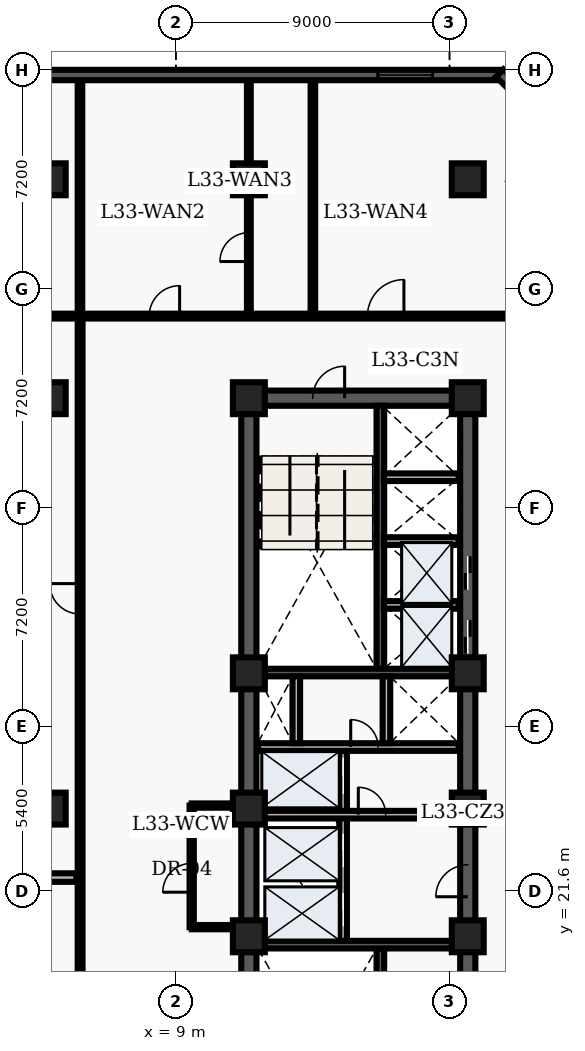
"""IFC4 building model, lengths in metres.
Left out: names, types, materials, properties, quantities, classifications, styles, units other than length and angle.
Written with IfcOpenShell. Run it as: python <this file> out.ifc"""

import sys

from ifc_helpers import new_model, entity, si_unit, converted_unit, direction, frame, origin_with_axes, origin_2d_with_axis, place, context, subcontext, project, spatial, polyline, rectangle, outline, extrude, element, fill, save


model = new_model("IFC4")
c1 = context("Model", 3, precision=1e-05, world=origin_with_axes(), true_north=direction((0.0, 1.0)))
c2 = subcontext(c1, "Body", "Model", "MODEL_VIEW")
j1 = project(units=[si_unit("LENGTHUNIT", "METRE"), converted_unit("PLANEANGLEUNIT", "DEGREE", entity("IfcPlaneAngleMeasure", 0.017), si_unit("PLANEANGLEUNIT", "RADIAN"), dimensions=[0, 0, 0, 0, 0, 0, 0])], contexts=[c1])
p1 = place(None, origin_with_axes())
s1 = spatial("IfcSite", under=j1, at=p1, CompositionType="ELEMENT")
p2 = place(p1, origin_with_axes())
s2 = spatial("IfcBuilding", under=s1, at=p2, CompositionType="ELEMENT")
p3 = place(p2, frame((0.0, 0.0, 136.8), z_axis=(0.0, 0.0, 1.0), x_axis=(1.0, 0.0, 0.0)))
s3 = spatial("IfcBuildingStorey", under=s2, at=p3, CompositionType="ELEMENT", Elevation=136.8)
p4 = place(p3, frame((11.4, 10.8, 0.0), z_axis=(0.0, 0.0, 1.0), x_axis=(0.0, 1.0, 0.0)))
e1 = element("IfcWall", 1, at=p4, inside=s3, PredefinedType="SHEAR", context=c2, shape_type="SweptSolid", body=[
    extrude(outline(polyline([(0.0, -0.25), (27.0, -0.25), (27.0, 0.25), (0.0, 0.25), (0.0, -0.25)])), origin_with_axes(), (0.0, 0.0, 1.0), 3.66),
])
p5 = place(p3, frame((11.4, 37.8, 0.0), z_axis=(0.0, 0.0, 1.0), x_axis=(1.0, 0.0, 0.0)))
e2 = element("IfcWall", 2, at=p5, inside=s3, PredefinedType="SHEAR", context=c2, shape_type="SweptSolid", body=[
    extrude(outline(polyline([(0.0, -0.25), (7.2, -0.25), (7.2, 0.25), (0.0, 0.25), (0.0, -0.25)])), origin_with_axes(), (0.0, 0.0, 1.0), 3.66),
])
p6 = place(p5, frame((2.625, 0.0, 0.0), z_axis=(0.0, 0.0, 1.0), x_axis=(1.0, 0.0, 0.0)))
e3 = element("IfcOpeningElement", 3, at=p6, cuts=e2, PredefinedType="OPENING", context=c2, shape_type="SweptSolid", body=[
    extrude(rectangle(XDim=1.05, YDim=0.52, at=origin_2d_with_axis()), origin_with_axes(), (0.0, 0.0, 1.0), 2.15),
])
p7 = place(p3, frame((18.6, 10.8, 0.0), z_axis=(0.0, 0.0, 1.0), x_axis=(0.0, 1.0, 0.0)))
e4 = element("IfcWall", 4, at=p7, inside=s3, PredefinedType="SHEAR", context=c2, shape_type="SweptSolid", body=[
    extrude(outline(polyline([(0.0, -0.25), (13.5, -0.25), (13.5, 0.25), (0.0, 0.25), (0.0, -0.25)])), origin_with_axes(), (0.0, 0.0, 1.0), 3.66),
])
p8 = place(p7, frame((11.125, 0.0, 0.0), z_axis=(0.0, 0.0, 1.0), x_axis=(1.0, 0.0, 0.0)))
e5 = element("IfcOpeningElement", 5, at=p8, cuts=e4, PredefinedType="OPENING", context=c2, shape_type="SweptSolid", body=[
    extrude(rectangle(XDim=1.05, YDim=0.52, at=origin_2d_with_axis()), origin_with_axes(), (0.0, 0.0, 1.0), 2.15),
])
p9 = place(p7, frame((4.325, 0.0, 0.0), z_axis=(0.0, 0.0, 1.0), x_axis=(1.0, 0.0, 0.0)))
e6 = element("IfcOpeningElement", 6, at=p9, cuts=e4, PredefinedType="OPENING", context=c2, shape_type="SweptSolid", body=[
    extrude(rectangle(XDim=1.05, YDim=0.52, at=origin_2d_with_axis()), origin_with_axes(), (0.0, 0.0, 1.0), 2.15),
])
p10 = place(p3, frame((18.6, 24.3, 0.0), z_axis=(0.0, 0.0, 1.0), x_axis=(0.0, 1.0, 0.0)))
e7 = element("IfcWall", 7, at=p10, inside=s3, PredefinedType="SHEAR", context=c2, shape_type="SweptSolid", body=[
    extrude(outline(polyline([(0.0, -0.25), (13.5, -0.25), (13.5, 0.25), (0.0, 0.25), (0.0, -0.25)])), origin_with_axes(), (0.0, 0.0, 1.0), 3.66),
])
p11 = place(p10, frame((5.65, 0.0, 0.0), z_axis=(0.0, 0.0, 1.0), x_axis=(1.0, 0.0, 0.0)))
e8 = element("IfcOpeningElement", 8, at=p11, cuts=e7, PredefinedType="OPENING", context=c2, shape_type="SweptSolid", body=[
    extrude(rectangle(XDim=1.1, YDim=0.52, at=origin_2d_with_axis()), origin_with_axes(), (0.0, 0.0, 1.0), 2.15),
])
p12 = place(p10, frame((7.75, 0.0, 0.0), z_axis=(0.0, 0.0, 1.0), x_axis=(1.0, 0.0, 0.0)))
e9 = element("IfcOpeningElement", 9, at=p12, cuts=e7, PredefinedType="OPENING", context=c2, shape_type="SweptSolid", body=[
    extrude(rectangle(XDim=1.1, YDim=0.52, at=origin_2d_with_axis()), origin_with_axes(), (0.0, 0.0, 1.0), 2.15),
])
p13 = place(p3, frame((15.725, 11.05, 0.0), z_axis=(0.0, 0.0, 1.0), x_axis=(0.0, 1.0, 0.0)))
e10 = element("IfcWall", 10, at=p13, inside=s3, PredefinedType="SHEAR", context=c2, shape_type="SweptSolid", body=[
    extrude(outline(polyline([(0.0, -0.125), (8.65, -0.125), (8.65, 0.125), (0.0, 0.125), (0.0, -0.125)])), origin_with_axes(), (0.0, 0.0, 1.0), 3.66),
])
p14 = place(p3, frame((11.65, 19.825, 0.0), z_axis=(0.0, 0.0, 1.0), x_axis=(1.0, 0.0, 0.0)))
e11 = element("IfcWall", 11, at=p14, inside=s3, PredefinedType="SHEAR", context=c2, shape_type="SweptSolid", body=[
    extrude(outline(polyline([(0.0, -0.125), (6.7, -0.125), (6.7, 0.125), (0.0, 0.125), (0.0, -0.125)])), origin_with_axes(), (0.0, 0.0, 1.0), 3.66),
])
p15 = place(p3, frame((15.725, 28.9, 0.0), z_axis=(0.0, 0.0, 1.0), x_axis=(0.0, 1.0, 0.0)))
e12 = element("IfcWall", 12, at=p15, inside=s3, PredefinedType="SHEAR", context=c2, shape_type="SweptSolid", body=[
    extrude(outline(polyline([(0.0, -0.125), (8.65, -0.125), (8.65, 0.125), (0.0, 0.125), (0.0, -0.125)])), origin_with_axes(), (0.0, 0.0, 1.0), 3.66),
])
p16 = place(p3, frame((11.65, 28.775, 0.0), z_axis=(0.0, 0.0, 1.0), x_axis=(1.0, 0.0, 0.0)))
e13 = element("IfcWall", 13, at=p16, inside=s3, PredefinedType="SHEAR", context=c2, shape_type="SweptSolid", body=[
    extrude(outline(polyline([(0.0, -0.125), (6.7, -0.125), (6.7, 0.125), (0.0, 0.125), (0.0, -0.125)])), origin_with_axes(), (0.0, 0.0, 1.0), 3.66),
])
p17 = place(p3, frame((14.5, 19.95, 0.0), z_axis=(0.0, 0.0, 1.0), x_axis=(0.0, 1.0, 0.0)))
e14 = element("IfcWall", 14, at=p17, inside=s3, PredefinedType="SOLIDWALL", context=c2, shape_type="SweptSolid", body=[
    extrude(outline(polyline([(0.0, -0.125), (6.25, -0.125), (6.25, 0.125), (0.0, 0.125), (0.0, -0.125)])), origin_with_axes(), (0.0, 0.0, 1.0), 2.7),
])
p18 = place(p17, frame((1.025, 0.0, 0.0), z_axis=(0.0, 0.0, 1.0), x_axis=(1.0, 0.0, 0.0)))
e15 = element("IfcOpeningElement", 15, at=p18, cuts=e14, PredefinedType="OPENING", context=c2, shape_type="SweptSolid", body=[
    extrude(rectangle(XDim=1.1, YDim=0.27, at=origin_2d_with_axis()), origin_with_axes(), (0.0, 0.0, 1.0), 2.15),
])
p19 = place(p17, frame((2.975, 0.0, 0.0), z_axis=(0.0, 0.0, 1.0), x_axis=(1.0, 0.0, 0.0)))
e16 = element("IfcOpeningElement", 16, at=p19, cuts=e14, PredefinedType="OPENING", context=c2, shape_type="SweptSolid", body=[
    extrude(rectangle(XDim=1.1, YDim=0.27, at=origin_2d_with_axis()), origin_with_axes(), (0.0, 0.0, 1.0), 2.15),
])
p20 = place(p17, frame((5.425, 0.0, 0.0), z_axis=(0.0, 0.0, 1.0), x_axis=(1.0, 0.0, 0.0)))
e17 = element("IfcOpeningElement", 17, at=p20, cuts=e14, PredefinedType="OPENING", context=c2, shape_type="SweptSolid", body=[
    extrude(rectangle(XDim=1.2, YDim=0.27, at=origin_2d_with_axis()), origin_with_axes(), (0.0, 0.0, 1.0), 2.15),
])
p21 = place(p3, frame((11.7, 24.1, 0.0), z_axis=(0.0, 0.0, 1.0), x_axis=(1.0, 0.0, 0.0)))
e18 = element("IfcWall", 18, at=p21, inside=s3, PredefinedType="SOLIDWALL", context=c2, shape_type="SweptSolid", body=[
    extrude(outline(polyline([(0.0, -0.125), (6.6, -0.125), (6.6, 0.125), (0.0, 0.125), (0.0, -0.125)])), origin_with_axes(), (0.0, 0.0, 1.0), 2.7),
])
p22 = place(p21, frame((3.75, 0.0, 0.0), z_axis=(0.0, 0.0, 1.0), x_axis=(1.0, 0.0, 0.0)))
e19 = element("IfcOpeningElement", 19, at=p22, cuts=e18, PredefinedType="OPENING", context=c2, shape_type="SweptSolid", body=[
    extrude(rectangle(XDim=0.9, YDim=0.27, at=origin_2d_with_axis()), origin_with_axes(), (0.0, 0.0, 1.0), 2.15),
])
p23 = place(p3, frame((11.7, 26.325, 0.0), z_axis=(0.0, 0.0, 1.0), x_axis=(1.0, 0.0, 0.0)))
e20 = element("IfcWall", 20, at=p23, inside=s3, PredefinedType="SOLIDWALL", context=c2, shape_type="SweptSolid", body=[
    extrude(outline(polyline([(0.0, -0.125), (6.6, -0.125), (6.6, 0.125), (0.0, 0.125), (0.0, -0.125)])), origin_with_axes(), (0.0, 0.0, 1.0), 2.7),
])
p24 = place(p23, frame((3.5, 0.0, 0.0), z_axis=(0.0, 0.0, 1.0), x_axis=(1.0, 0.0, 0.0)))
e21 = element("IfcOpeningElement", 21, at=p24, cuts=e20, PredefinedType="OPENING", context=c2, shape_type="SweptSolid", body=[
    extrude(rectangle(XDim=0.9, YDim=0.27, at=origin_2d_with_axis()), origin_with_axes(), (0.0, 0.0, 1.0), 2.15),
])
for number, where, z_axis, x_axis in (
    (22, (12.96, 26.45, 0.0), (0.0, 0.0, 1.0), (0.0, 1.0, 0.0)),
    (23, (15.925, 26.45, 0.0), (0.0, 0.0, 1.0), (0.0, 1.0, 0.0)),
):
    element("IfcWall", number, at=place(p3, frame(where, z_axis=z_axis, x_axis=x_axis)), inside=s3, PredefinedType="SOLIDWALL", context=c2, shape_type="SweptSolid", body=[
        extrude(outline(polyline([(0.0, -0.125), (2.2, -0.125), (2.2, 0.125), (0.0, 0.125), (0.0, -0.125)])), origin_with_axes(), (0.0, 0.0, 1.0), 2.7),
    ])
for number, where, z_axis, x_axis in (
    (24, (11.4, 20.1, 0.0), (0.0, 0.0, 1.0), (1.0, 0.0, 0.0)),
    (25, (11.4, 24.3, 0.0), (0.0, 0.0, 1.0), (1.0, 0.0, 0.0)),
    (26, (11.4, 28.75, 0.0), (0.0, 0.0, 1.0), (1.0, 0.0, 0.0)),
    (27, (11.4, 37.8, 0.0), (0.0, 0.0, 1.0), (1.0, 0.0, 0.0)),
    (28, (11.4, 45.0, 0.0), (0.0, 0.0, 1.0), (1.0, 0.0, 0.0)),
    (29, (18.6, 20.1, 0.0), (0.0, 0.0, 1.0), (1.0, 0.0, 0.0)),
    (30, (18.6, 24.3, 0.0), (0.0, 0.0, 1.0), (1.0, 0.0, 0.0)),
    (31, (18.6, 28.75, 0.0), (0.0, 0.0, 1.0), (1.0, 0.0, 0.0)),
    (32, (18.6, 37.8, 0.0), (0.0, 0.0, 1.0), (1.0, 0.0, 0.0)),
    (33, (18.6, 45.0, 0.0), (0.0, 0.0, 1.0), (1.0, 0.0, 0.0)),
    (34, (4.85, 24.3, 0.0), (0.0, 0.0, 1.0), (1.0, 0.0, 0.0)),
    (35, (4.85, 37.8, 0.0), (0.0, 0.0, 1.0), (1.0, 0.0, 0.0)),
    (36, (4.85, 45.0, 0.0), (0.0, 0.0, 1.0), (1.0, 0.0, 0.0)),
):
    element("IfcColumn", number, at=place(p3, frame(where, z_axis=z_axis, x_axis=x_axis)), inside=s3, PredefinedType="COLUMN", context=c2, shape_type="SweptSolid", body=[
        extrude(rectangle(XDim=1.05, YDim=1.05, at=origin_2d_with_axis()), origin_with_axes(), (0.0, 0.0, 1.0), 3.9),
    ])
for number, where, z_axis, x_axis in (
    (37, (15.84, 31.0, 0.0), (0.0, 0.0, 1.0), (1.0, 0.0, 0.0)),
    (38, (15.84, 33.1, 0.0), (0.0, 0.0, 1.0), (1.0, 0.0, 0.0)),
    (39, (15.84, 35.2, 0.0), (0.0, 0.0, 1.0), (1.0, 0.0, 0.0)),
):
    element("IfcWall", number, at=place(p3, frame(where, z_axis=z_axis, x_axis=x_axis)), inside=s3, PredefinedType="SOLIDWALL", context=c2, shape_type="SweptSolid", body=[
        extrude(outline(polyline([(0.0, -0.125), (2.46, -0.125), (2.46, 0.125), (0.0, 0.125), (0.0, -0.125)])), origin_with_axes(), (0.0, 0.0, 1.0), 2.7),
    ])
p25 = place(p3, frame((9.52, 20.4, 0.0), z_axis=(0.0, 0.0, 1.0), x_axis=(0.0, 1.0, 0.0)))
e40 = element("IfcWall", 40, at=p25, inside=s3, PredefinedType="PARTITIONING", context=c2, shape_type="SweptSolid", body=[
    extrude(outline(polyline([(0.0, -0.07), (4.0, -0.07), (4.0, 0.07), (0.0, 0.07), (0.0, -0.07)])), origin_with_axes(), (0.0, 0.0, 1.0), 2.7),
])
p26 = place(p25, frame((1.625, 0.0, 0.0), z_axis=(0.0, 0.0, 1.0), x_axis=(1.0, 0.0, 0.0)))
e41 = element("IfcOpeningElement", 41, at=p26, cuts=e40, PredefinedType="OPENING", context=c2, shape_type="SweptSolid", body=[
    extrude(rectangle(XDim=0.95, YDim=0.16, at=origin_2d_with_axis()), origin_with_axes(), (0.0, 0.0, 1.0), 2.15),
])
for number, where, z_axis, x_axis in (
    (42, (9.52, 20.4, 0.0), (0.0, 0.0, 1.0), (1.0, 0.0, 0.0)),
    (43, (9.52, 24.4, 0.0), (0.0, 0.0, 1.0), (1.0, 0.0, 0.0)),
):
    element("IfcWall", number, at=place(p3, frame(where, z_axis=z_axis, x_axis=x_axis)), inside=s3, PredefinedType="PARTITIONING", context=c2, shape_type="SweptSolid", body=[
        extrude(outline(polyline([(0.0, -0.07), (1.58, -0.07), (1.58, 0.07), (0.0, 0.07), (0.0, -0.07)])), origin_with_axes(), (0.0, 0.0, 1.0), 2.7),
    ])
p27 = place(p3, frame((2.6, 40.5, 0.0), z_axis=(0.0, 0.0, 1.0), x_axis=(1.0, 0.0, 0.0)))
e44 = element("IfcWall", 44, at=p27, inside=s3, PredefinedType="PARTITIONING", context=c2, shape_type="SweptSolid", body=[
    extrude(outline(polyline([(0.0, -0.08), (18.89, -0.08), (18.89, 0.08), (0.0, 0.08), (0.0, -0.08)])), origin_with_axes(), (0.0, 0.0, 1.0), 2.7),
])
p28 = place(p27, frame((1.057, 0.0, 0.0), z_axis=(0.0, 0.0, 1.0), x_axis=(1.0, 0.0, 0.0)))
e45 = element("IfcOpeningElement", 45, at=p28, cuts=e44, PredefinedType="OPENING", context=c2, shape_type="SweptSolid", body=[
    extrude(rectangle(XDim=1.0, YDim=0.18, at=origin_2d_with_axis()), origin_with_axes(), (0.0, 0.0, 1.0), 2.15),
])
p29 = place(p27, frame((6.022, 0.0, 0.0), z_axis=(0.0, 0.0, 1.0), x_axis=(1.0, 0.0, 0.0)))
e46 = element("IfcOpeningElement", 46, at=p29, cuts=e44, PredefinedType="OPENING", context=c2, shape_type="SweptSolid", body=[
    extrude(rectangle(XDim=1.0, YDim=0.18, at=origin_2d_with_axis()), origin_with_axes(), (0.0, 0.0, 1.0), 2.15),
])
p30 = place(p27, frame((13.3, 0.0, 0.0), z_axis=(0.0, 0.0, 1.0), x_axis=(1.0, 0.0, 0.0)))
e47 = element("IfcOpeningElement", 47, at=p30, cuts=e44, PredefinedType="OPENING", context=c2, shape_type="SweptSolid", body=[
    extrude(rectangle(XDim=1.2, YDim=0.18, at=origin_2d_with_axis()), origin_with_axes(), (0.0, 0.0, 1.0), 2.2),
])
p31 = place(p3, frame((5.85, 7.8, 0.0), z_axis=(0.0, 0.0, 1.0), x_axis=(0.0, 1.0, 0.0)))
e48 = element("IfcWall", 48, at=p31, inside=s3, PredefinedType="PARTITIONING", context=c2, shape_type="SweptSolid", body=[
    extrude(outline(polyline([(0.0, -0.08), (32.7, -0.08), (32.7, 0.08), (0.0, 0.08), (0.0, -0.08)])), origin_with_axes(), (0.0, 0.0, 1.0), 2.7),
])
p32 = place(p31, frame((7.181, 0.0, 0.0), z_axis=(0.0, 0.0, 1.0), x_axis=(1.0, 0.0, 0.0)))
e49 = element("IfcOpeningElement", 49, at=p32, cuts=e48, PredefinedType="OPENING", context=c2, shape_type="SweptSolid", body=[
    extrude(rectangle(XDim=1.0, YDim=0.18, at=origin_2d_with_axis()), origin_with_axes(), (0.0, 0.0, 1.0), 2.15),
])
p33 = place(p31, frame((23.401, 0.0, 0.0), z_axis=(0.0, 0.0, 1.0), x_axis=(1.0, 0.0, 0.0)))
e50 = element("IfcOpeningElement", 50, at=p33, cuts=e48, PredefinedType="OPENING", context=c2, shape_type="SweptSolid", body=[
    extrude(rectangle(XDim=1.0, YDim=0.18, at=origin_2d_with_axis()), origin_with_axes(), (0.0, 0.0, 1.0), 2.15),
])
p34 = place(p3, frame((0.335, 22.031, 0.0), z_axis=(0.0, 0.0, 1.0), x_axis=(1.0, 0.0, 0.0)))
e51 = element("IfcWall", 51, at=p34, inside=s3, PredefinedType="PARTITIONING", context=c2, shape_type="SweptSolid", body=[
    extrude(outline(polyline([(0.0, -0.14), (5.395, -0.14), (5.395, 0.14), (0.0, 0.14), (0.0, -0.14)])), origin_with_axes(), (0.0, 0.0, 1.0), 2.7),
])
p35 = place(p3, frame((5.845, 40.6, 0.0), z_axis=(0.0, 0.0, 1.0), x_axis=(0.0, 1.0, 0.0)))
e52 = element("IfcWall", 52, at=p35, inside=s3, PredefinedType="PARTITIONING", context=c2, shape_type="SweptSolid", body=[
    extrude(outline(polyline([(0.0, -0.075), (7.665, -0.075), (7.665, 0.075), (0.0, 0.075), (0.0, -0.075)])), origin_with_axes(), (0.0, 0.0, 1.0), 2.7),
])
p36 = place(p3, frame((11.4, 40.6, 0.0), z_axis=(0.0, 0.0, 1.0), x_axis=(0.0, 1.0, 0.0)))
e53 = element("IfcWall", 53, at=p36, inside=s3, PredefinedType="PARTITIONING", context=c2, shape_type="SweptSolid", body=[
    extrude(outline(polyline([(0.0, -0.062), (7.665, -0.062), (7.665, 0.062), (0.0, 0.062), (0.0, -0.062)])), origin_with_axes(), (0.0, 0.0, 1.0), 2.7),
])
p37 = place(p36, frame((2.17, 0.0, 0.0), z_axis=(0.0, 0.0, 1.0), x_axis=(1.0, 0.0, 0.0)))
e54 = element("IfcOpeningElement", 54, at=p37, cuts=e53, PredefinedType="OPENING", context=c2, shape_type="SweptSolid", body=[
    extrude(rectangle(XDim=0.95, YDim=0.145, at=origin_2d_with_axis()), origin_with_axes(), (0.0, 0.0, 1.0), 2.15),
])
p38 = place(p3, frame((13.506, 40.6, 0.0), z_axis=(0.0, 0.0, 1.0), x_axis=(0.0, 1.0, 0.0)))
e55 = element("IfcWall", 55, at=p38, inside=s3, PredefinedType="PARTITIONING", context=c2, shape_type="SweptSolid", body=[
    extrude(outline(polyline([(0.0, -0.075), (7.665, -0.075), (7.665, 0.075), (0.0, 0.075), (0.0, -0.075)])), origin_with_axes(), (0.0, 0.0, 1.0), 2.7),
])
p39 = place(p3, frame((2.74, 48.43, 0.0), z_axis=(0.0, 0.0, 1.0), x_axis=(1.0, 0.0, 0.0)))
e56 = element("IfcWall", 56, at=p39, inside=s3, PredefinedType="SOLIDWALL", context=c2, shape_type="SweptSolid", body=[
    extrude(outline(polyline([(0.0, -0.17), (17.045, -0.17), (17.045, 0.17), (0.0, 0.17), (0.0, -0.17)])), origin_with_axes(), (0.0, 0.0, 1.0), 3.66),
])
p40 = place(p39, frame((13.804, 0.0, 0.45), z_axis=(0.0, 0.0, 1.0), x_axis=(1.0, 0.0, 0.0)))
e57 = element("IfcOpeningElement", 57, at=p40, cuts=e56, PredefinedType="OPENING", context=c2, shape_type="SweptSolid", body=[
    extrude(rectangle(XDim=1.8, YDim=0.36, at=origin_2d_with_axis()), origin_with_axes(), (0.0, 0.0, 1.0), 2.1),
])
p41 = place(p3, frame((19.651, 48.494, 0.0), z_axis=(0.0, 0.0, 1.0), x_axis=(0.707107, -0.707107, 0.0)))
e58 = element("IfcWall", 58, at=p41, inside=s3, PredefinedType="SOLIDWALL", context=c2, shape_type="SweptSolid", body=[
    extrude(outline(polyline([(0.0, -0.17), (2.905, -0.17), (2.905, 0.17), (0.0, 0.17), (0.0, -0.17)])), origin_with_axes(), (0.0, 0.0, 1.0), 3.66),
])
p42 = place(p10, frame((5.65, 0.0, 0.0), z_axis=(0.0, 0.0, 1.0), x_axis=(1.0, 0.0, 0.0)))
e59 = element("IfcDoor", 59, at=p42, inside=s3, OperationType="SLIDING_TO_LEFT", PredefinedType="DOOR", context=c2, shape_type="SweptSolid", body=[
    extrude(rectangle(XDim=1.1, YDim=0.09, at=origin_2d_with_axis()), origin_with_axes(), (0.0, 0.0, 1.0), 2.15),
])
fill(e8, e59)
p43 = place(p10, frame((7.75, 0.0, 0.0), z_axis=(0.0, 0.0, 1.0), x_axis=(1.0, 0.0, 0.0)))
e60 = element("IfcDoor", 60, at=p43, inside=s3, OperationType="SLIDING_TO_RIGHT", PredefinedType="DOOR", context=c2, shape_type="SweptSolid", body=[
    extrude(rectangle(XDim=1.1, YDim=0.09, at=origin_2d_with_axis()), origin_with_axes(), (0.0, 0.0, 1.0), 2.15),
])
fill(e9, e60)
p44 = place(p17, frame((1.025, 0.0, 0.0), z_axis=(0.0, 0.0, 1.0), x_axis=(1.0, 0.0, 0.0)))
e61 = element("IfcDoor", 61, at=p44, inside=s3, OperationType="SLIDING_TO_LEFT", PredefinedType="DOOR", context=c2, shape_type="SweptSolid", body=[
    extrude(rectangle(XDim=1.1, YDim=0.09, at=origin_2d_with_axis()), origin_with_axes(), (0.0, 0.0, 1.0), 2.15),
])
fill(e15, e61)
p45 = place(p17, frame((2.975, 0.0, 0.0), z_axis=(0.0, 0.0, 1.0), x_axis=(1.0, 0.0, 0.0)))
e62 = element("IfcDoor", 62, at=p45, inside=s3, OperationType="SLIDING_TO_RIGHT", PredefinedType="DOOR", context=c2, shape_type="SweptSolid", body=[
    extrude(rectangle(XDim=1.1, YDim=0.09, at=origin_2d_with_axis()), origin_with_axes(), (0.0, 0.0, 1.0), 2.15),
])
fill(e16, e62)
p46 = place(p17, frame((5.425, 0.0, 0.0), z_axis=(0.0, 0.0, 1.0), x_axis=(1.0, 0.0, 0.0)))
e63 = element("IfcDoor", 63, at=p46, inside=s3, OperationType="DOUBLE_DOOR_SLIDING", PredefinedType="DOOR", context=c2, shape_type="SweptSolid", body=[
    extrude(rectangle(XDim=1.2, YDim=0.09, at=origin_2d_with_axis()), origin_with_axes(), (0.0, 0.0, 1.0), 2.15),
])
fill(e17, e63)
p47 = place(p5, frame((2.625, 0.0, 0.0), z_axis=(0.0, 0.0, 1.0), x_axis=(1.0, 0.0, 0.0)))
e64 = element("IfcDoor", 64, at=p47, inside=s3, OperationType="SINGLE_SWING_RIGHT", PredefinedType="DOOR", context=c2, shape_type="SweptSolid", body=[
    extrude(rectangle(XDim=1.05, YDim=0.09, at=origin_2d_with_axis()), origin_with_axes(), (0.0, 0.0, 1.0), 2.15),
])
fill(e3, e64)
p48 = place(p7, frame((11.125, 0.0, 0.0), z_axis=(0.0, 0.0, 1.0), x_axis=(1.0, 0.0, 0.0)))
e65 = element("IfcDoor", 65, at=p48, inside=s3, OperationType="SINGLE_SWING_LEFT", PredefinedType="DOOR", context=c2, shape_type="SweptSolid", body=[
    extrude(rectangle(XDim=1.05, YDim=0.09, at=origin_2d_with_axis()), origin_with_axes(), (0.0, 0.0, 1.0), 2.15),
])
fill(e5, e65)
p49 = place(p21, frame((3.75, 0.0, 0.0), z_axis=(0.0, 0.0, 1.0), x_axis=(1.0, 0.0, 0.0)))
e66 = element("IfcDoor", 66, at=p49, inside=s3, OperationType="SINGLE_SWING_LEFT", PredefinedType="DOOR", context=c2, shape_type="SweptSolid", body=[
    extrude(rectangle(XDim=0.9, YDim=0.09, at=origin_2d_with_axis()), origin_with_axes(), (0.0, 0.0, 1.0), 2.15),
])
fill(e19, e66)
p50 = place(p23, frame((3.5, 0.0, 0.0), z_axis=(0.0, 0.0, 1.0), x_axis=(1.0, 0.0, 0.0)))
e67 = element("IfcDoor", 67, at=p50, inside=s3, OperationType="SINGLE_SWING_LEFT", PredefinedType="DOOR", context=c2, shape_type="SweptSolid", body=[
    extrude(rectangle(XDim=0.9, YDim=0.09, at=origin_2d_with_axis()), origin_with_axes(), (0.0, 0.0, 1.0), 2.15),
])
fill(e21, e67)
p51 = place(p25, frame((1.625, 0.0, 0.0), z_axis=(0.0, 0.0, 1.0), x_axis=(1.0, 0.0, 0.0)))
e68 = element("IfcDoor", 68, at=p51, inside=s3, OperationType="SINGLE_SWING_LEFT", PredefinedType="DOOR", context=c2, shape_type="SweptSolid", body=[
    extrude(rectangle(XDim=0.95, YDim=0.084, at=origin_2d_with_axis()), origin_with_axes(), (0.0, 0.0, 1.0), 2.15),
])
fill(e41, e68)
p52 = place(p31, frame((23.401, 0.0, 0.0), z_axis=(0.0, 0.0, 1.0), x_axis=(1.0, 0.0, 0.0)))
e69 = element("IfcDoor", 69, at=p52, inside=s3, OperationType="SINGLE_SWING_RIGHT", PredefinedType="DOOR", context=c2, shape_type="SweptSolid", body=[
    extrude(rectangle(XDim=1.0, YDim=0.09, at=origin_2d_with_axis()), origin_with_axes(), (0.0, 0.0, 1.0), 2.15),
])
fill(e50, e69)
p53 = place(p27, frame((6.022, 0.0, 0.0), z_axis=(0.0, 0.0, 1.0), x_axis=(1.0, 0.0, 0.0)))
e70 = element("IfcDoor", 70, at=p53, inside=s3, OperationType="SINGLE_SWING_RIGHT", PredefinedType="DOOR", context=c2, shape_type="SweptSolid", body=[
    extrude(rectangle(XDim=1.0, YDim=0.09, at=origin_2d_with_axis()), origin_with_axes(), (0.0, 0.0, 1.0), 2.15),
])
fill(e46, e70)
p54 = place(p36, frame((2.17, 0.0, 0.0), z_axis=(0.0, 0.0, 1.0), x_axis=(1.0, 0.0, 0.0)))
e71 = element("IfcDoor", 71, at=p54, inside=s3, OperationType="SINGLE_SWING_LEFT", PredefinedType="DOOR", context=c2, shape_type="SweptSolid", body=[
    extrude(rectangle(XDim=0.95, YDim=0.075, at=origin_2d_with_axis()), origin_with_axes(), (0.0, 0.0, 1.0), 2.15),
])
fill(e54, e71)
p55 = place(p27, frame((13.3, 0.0, 0.0), z_axis=(0.0, 0.0, 1.0), x_axis=(1.0, 0.0, 0.0)))
e72 = element("IfcDoor", 72, at=p55, inside=s3, OperationType="SINGLE_SWING_RIGHT", PredefinedType="DOOR", context=c2, shape_type="SweptSolid", body=[
    extrude(rectangle(XDim=1.2, YDim=0.09, at=origin_2d_with_axis()), origin_with_axes(), (0.0, 0.0, 1.0), 2.2),
])
fill(e47, e72)
p56 = place(p39, frame((13.804, 0.0, 0.45), z_axis=(0.0, 0.0, 1.0), x_axis=(1.0, 0.0, 0.0)))
e73 = element("IfcWindow", 73, at=p56, inside=s3, PredefinedType="WINDOW", context=c2, shape_type="SweptSolid", body=[
    extrude(rectangle(XDim=1.8, YDim=0.09, at=origin_2d_with_axis()), origin_with_axes(), (0.0, 0.0, 1.0), 2.1),
])
fill(e57, e73)
save(model, sys.argv[1])
